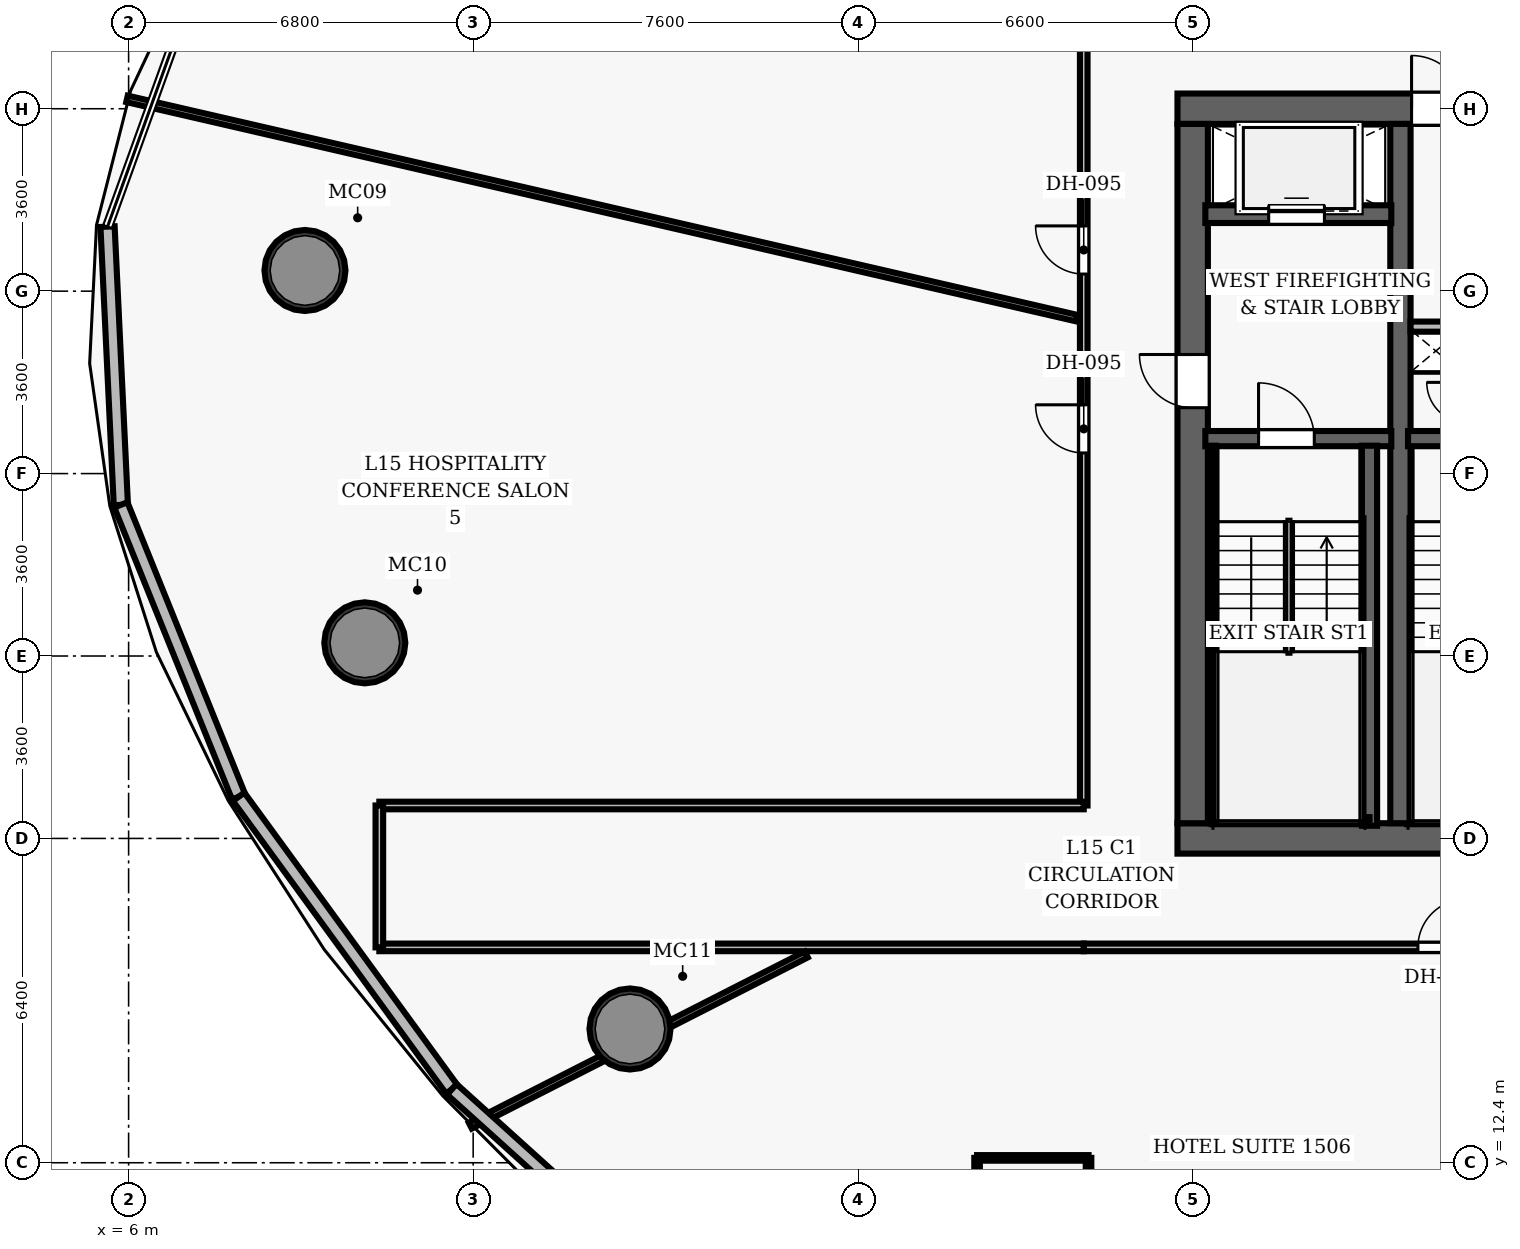
"""IFC4 building model, lengths in metres.
Left out: names, types, materials, properties, quantities, classifications, styles, units other than length and angle.
Written with IfcOpenShell. Run it as: python <this file> out.ifc"""

import sys

from ifc_helpers import new_model, si_unit, direction, frame, frame_2d, origin, origin_2d, place, context, subcontext, project, spatial, rectangle, hollow_circle, extrude, element, fill, save


model = new_model("IFC4")
c1 = context("Model", 3, precision=1e-05, world=origin(), true_north=direction((0.0, 1.0)))
c2 = subcontext(c1, "Body", "Model", "MODEL_VIEW")
j1 = project(units=[si_unit("LENGTHUNIT", "METRE"), si_unit("PLANEANGLEUNIT", "RADIAN")], contexts=[c1])
p1 = place(None, origin())
s1 = spatial("IfcSite", under=j1, at=p1, CompositionType="ELEMENT")
p2 = place(p1, origin())
s2 = spatial("IfcBuilding", under=s1, at=p2, CompositionType="ELEMENT")
p3 = place(p2, frame((0.0, 0.0, 69.4)))
s3 = spatial("IfcBuildingStorey", under=s2, at=p3, CompositionType="ELEMENT", Elevation=69.4)
p4 = place(p3, frame((26.7, 18.8, 0.0), z_axis=(0.0, 0.0, 1.0), x_axis=(1.0, 0.0, 0.0)))
e1 = element("IfcWall", 1, at=p4, inside=s3, PredefinedType="SHEAR", context=c2, shape_type="SweptSolid", body=[
    extrude(rectangle(XDim=22.6, YDim=0.6, at=frame_2d((11.3, 0.0))), origin(), (0.0, 0.0, 1.0), 3.5),
])
p5 = place(p4, frame((14.52, 0.0, 0.0)))
e2 = element("IfcOpeningElement", 2, at=p5, cuts=e1, PredefinedType="OPENING", context=c2, shape_type="SweptSolid", body=[
    extrude(rectangle(XDim=1.05, YDim=2.15, at=frame_2d((0.525, 1.075))), frame((0.0, 0.31, 0.0), z_axis=(0.0, -1.0, 0.0), x_axis=(1.0, 0.0, 0.0)), (0.0, 0.0, 1.0), 0.62),
])
p6 = place(p3, frame((26.7, 33.2, 0.0), z_axis=(0.0, 0.0, 1.0), x_axis=(1.0, 0.0, 0.0)))
e3 = element("IfcWall", 3, at=p6, inside=s3, PredefinedType="SHEAR", context=c2, shape_type="SweptSolid", body=[
    extrude(rectangle(XDim=22.6, YDim=0.6, at=frame_2d((11.3, 0.0))), origin(), (0.0, 0.0, 1.0), 3.5),
])
p7 = place(p6, frame((4.62, 0.0, 0.0)))
e4 = element("IfcOpeningElement", 4, at=p7, cuts=e3, PredefinedType="OPENING", context=c2, shape_type="SweptSolid", body=[
    extrude(rectangle(XDim=1.05, YDim=2.15, at=frame_2d((0.525, 1.075))), frame((0.0, 0.31, 0.0), z_axis=(0.0, -1.0, 0.0), x_axis=(1.0, 0.0, 0.0)), (0.0, 0.0, 1.0), 0.62),
])
p8 = place(p6, frame((14.52, 0.0, 0.0)))
e5 = element("IfcOpeningElement", 5, at=p8, cuts=e3, PredefinedType="OPENING", context=c2, shape_type="SweptSolid", body=[
    extrude(rectangle(XDim=1.05, YDim=2.15, at=frame_2d((0.525, 1.075))), frame((0.0, 0.31, 0.0), z_axis=(0.0, -1.0, 0.0), x_axis=(1.0, 0.0, 0.0)), (0.0, 0.0, 1.0), 0.62),
])
p9 = place(p3, frame((27.0, 19.1, 0.0), z_axis=(0.0, 0.0, 1.0), x_axis=(0.0, 1.0, 0.0)))
e6 = element("IfcWall", 6, at=p9, inside=s3, PredefinedType="SHEAR", context=c2, shape_type="SweptSolid", body=[
    extrude(rectangle(XDim=13.8, YDim=0.6, at=frame_2d((6.9, 0.0))), origin(), (0.0, 0.0, 1.0), 3.5),
])
p10 = place(p9, frame((8.2, 0.0, 0.0)))
e7 = element("IfcOpeningElement", 7, at=p10, cuts=e6, PredefinedType="OPENING", context=c2, shape_type="SweptSolid", body=[
    extrude(rectangle(XDim=1.05, YDim=2.15, at=frame_2d((0.525, 1.075))), frame((0.0, 0.31, 0.0), z_axis=(0.0, -1.0, 0.0), x_axis=(1.0, 0.0, 0.0)), (0.0, 0.0, 1.0), 0.62),
])
p11 = place(p3, frame((31.1, 19.1, 0.0), z_axis=(0.0, 0.0, 1.0), x_axis=(0.0, 1.0, 0.0)))
e8 = element("IfcWall", 8, at=p11, inside=s3, PredefinedType="SHEAR", context=c2, shape_type="SweptSolid", body=[
    extrude(rectangle(XDim=13.8, YDim=0.4, at=frame_2d((6.9, 0.0))), origin(), (0.0, 0.0, 1.0), 3.5),
])
for number, where, z_axis, x_axis in (
    (9, (9.48, 30.008, 0.0), (0.0, 0.0, 1.0), (1.0, 0.0, 0.0)),
    (10, (10.661, 22.66, 0.0), (0.0, 0.0, 1.0), (1.0, 0.0, 0.0)),
    (11, (15.895, 15.04, 0.0), (0.0, 0.0, 1.0), (1.0, 0.0, 0.0)),
):
    element("IfcColumn", number, at=place(p3, frame(where, z_axis=z_axis, x_axis=x_axis)), inside=s3, PredefinedType="COLUMN", context=c2, shape_type="SweptSolid", body=[
        extrude(hollow_circle(Radius=0.8, WallThickness=0.06, at=origin_2d()), origin(), (0.0, 0.0, 1.0), 3.5),
    ])
p12 = place(p3, frame((27.25, 26.69, 0.0), z_axis=(0.0, 0.0, 1.0), x_axis=(1.0, 0.0, 0.0)))
e12 = element("IfcWall", 12, at=p12, inside=s3, PredefinedType="SHEAR", context=c2, shape_type="SweptSolid", body=[
    extrude(rectangle(XDim=3.67, YDim=0.3, at=frame_2d((1.835, 0.0))), origin(), (0.0, 0.0, 1.0), 3.5),
])
p13 = place(p12, frame((1.05, 0.0, 0.0)))
e13 = element("IfcOpeningElement", 13, at=p13, cuts=e12, PredefinedType="OPENING", context=c2, shape_type="SweptSolid", body=[
    extrude(rectangle(XDim=1.1, YDim=2.15, at=frame_2d((0.55, 1.075))), frame((0.0, 0.16, 0.0), z_axis=(0.0, -1.0, 0.0), x_axis=(1.0, 0.0, 0.0)), (0.0, 0.0, 1.0), 0.32),
])
p14 = place(p3, frame((30.49, 19.05, 0.0), z_axis=(0.0, 0.0, 1.0), x_axis=(0.0, 1.0, 0.0)))
e14 = element("IfcWall", 14, at=p14, inside=s3, PredefinedType="SHEAR", context=c2, shape_type="SweptSolid", body=[
    extrude(rectangle(XDim=7.5, YDim=0.3, at=frame_2d((3.75, 0.0))), origin(), (0.0, 0.0, 1.0), 3.5),
])
p15 = place(p3, frame((27.395, 19.1, 0.0), z_axis=(0.0, 0.0, 1.0), x_axis=(0.0, 1.0, 0.0)))
e15 = element("IfcWall", 15, at=p15, inside=s3, PredefinedType="SHEAR", context=c2, shape_type="SweptSolid", body=[
    extrude(rectangle(XDim=7.45, YDim=0.12, at=frame_2d((3.725, 0.0))), origin(), (0.0, 0.0, 1.0), 3.5),
])
p16 = place(p3, frame((27.395, 19.16, 0.0), z_axis=(0.0, 0.0, 1.0), x_axis=(1.0, 0.0, 0.0)))
e16 = element("IfcWall", 16, at=p16, inside=s3, PredefinedType="SHEAR", context=c2, shape_type="SweptSolid", body=[
    extrude(rectangle(XDim=3.095, YDim=0.12, at=frame_2d((1.547, 0.0))), origin(), (0.0, 0.0, 1.0), 3.5),
])
p17 = place(p3, frame((27.25, 31.12, 0.0), z_axis=(0.0, 0.0, 1.0), x_axis=(1.0, 0.0, 0.0)))
e17 = element("IfcWall", 17, at=p17, inside=s3, PredefinedType="SHEAR", context=c2, shape_type="SweptSolid", body=[
    extrude(rectangle(XDim=3.67, YDim=0.35, at=frame_2d((1.835, 0.0))), origin(), (0.0, 0.0, 1.0), 2.6),
])
p18 = place(p17, frame((1.25, 0.0, 0.0)))
e18 = element("IfcOpeningElement", 18, at=p18, cuts=e17, PredefinedType="OPENING", context=c2, shape_type="SweptSolid", body=[
    extrude(rectangle(XDim=1.1, YDim=2.15, at=frame_2d((0.55, 1.075))), frame((0.0, 0.185, 0.0), z_axis=(0.0, -1.0, 0.0), x_axis=(1.0, 0.0, 0.0)), (0.0, 0.0, 1.0), 0.37),
])
p19 = place(p3, frame((31.25, 26.69, 0.0), z_axis=(0.0, 0.0, 1.0), x_axis=(1.0, 0.0, 0.0)))
e19 = element("IfcWall", 19, at=p19, inside=s3, PredefinedType="SHEAR", context=c2, shape_type="SweptSolid", body=[
    extrude(rectangle(XDim=3.56, YDim=0.3, at=frame_2d((1.78, 0.0))), origin(), (0.0, 0.0, 1.0), 3.5),
])
p20 = place(p19, frame((1.55, 0.0, 0.0)))
e20 = element("IfcOpeningElement", 20, at=p20, cuts=e19, PredefinedType="OPENING", context=c2, shape_type="SweptSolid", body=[
    extrude(rectangle(XDim=1.1, YDim=2.15, at=frame_2d((0.55, 1.075))), frame((0.0, 0.16, 0.0), z_axis=(0.0, -1.0, 0.0), x_axis=(1.0, 0.0, 0.0)), (0.0, 0.0, 1.0), 0.32),
])
p21 = place(p3, frame((31.3, 19.16, 0.0), z_axis=(0.0, 0.0, 1.0), x_axis=(1.0, 0.0, 0.0)))
e21 = element("IfcWall", 21, at=p21, inside=s3, PredefinedType="SHEAR", context=c2, shape_type="SweptSolid", body=[
    extrude(rectangle(XDim=3.04, YDim=0.12, at=frame_2d((1.52, 0.0))), origin(), (0.0, 0.0, 1.0), 3.5),
])
p22 = place(p3, frame((31.3, 28.9, 0.0), z_axis=(0.0, 0.0, 1.0), x_axis=(1.0, 0.0, 0.0)))
e22 = element("IfcWall", 22, at=p22, inside=s3, PredefinedType="PARTITIONING", context=c2, shape_type="SweptSolid", body=[
    extrude(rectangle(XDim=1.12, YDim=0.2, at=frame_2d((0.56, 0.0))), origin(), (0.0, 0.0, 1.0), 2.6),
])
p23 = place(p3, frame((24.85, 16.65, 0.0), z_axis=(0.0, 0.0, 1.0), x_axis=(1.0, 0.0, 0.0)))
e23 = element("IfcWall", 23, at=p23, inside=s3, PredefinedType="PARTITIONING", context=c2, shape_type="SweptSolid", body=[
    extrude(rectangle(XDim=23.5, YDim=0.15, at=frame_2d((11.75, 0.0))), origin(), (0.0, 0.0, 1.0), 2.6),
])
p24 = place(p23, frame((6.595, 0.0, 0.0)))
e24 = element("IfcOpeningElement", 24, at=p24, cuts=e23, PredefinedType="OPENING", context=c2, shape_type="SweptSolid", body=[
    extrude(rectangle(XDim=0.95, YDim=2.15, at=frame_2d((0.475, 1.075))), frame((0.0, 0.085, 0.0), z_axis=(0.0, -1.0, 0.0), x_axis=(1.0, 0.0, 0.0)), (0.0, 0.0, 1.0), 0.17),
])
p25 = place(p23, frame((13.99, 0.0, 0.0)))
e25 = element("IfcOpeningElement", 25, at=p25, cuts=e23, PredefinedType="OPENING", context=c2, shape_type="SweptSolid", body=[
    extrude(rectangle(XDim=0.95, YDim=2.15, at=frame_2d((0.475, 1.075))), frame((0.0, 0.085, 0.0), z_axis=(0.0, -1.0, 0.0), x_axis=(1.0, 0.0, 0.0)), (0.0, 0.0, 1.0), 0.17),
])
p26 = place(p23, frame((17.211, 0.0, 0.0)))
e26 = element("IfcOpeningElement", 26, at=p26, cuts=e23, PredefinedType="OPENING", context=c2, shape_type="SweptSolid", body=[
    extrude(rectangle(XDim=0.95, YDim=2.15, at=frame_2d((0.475, 1.075))), frame((0.0, 0.085, 0.0), z_axis=(0.0, -1.0, 0.0), x_axis=(1.0, 0.0, 0.0)), (0.0, 0.0, 1.0), 0.17),
])
p27 = place(p3, frame((24.85, 19.45, 0.0), z_axis=(0.0, 0.0, 1.0), x_axis=(0.0, 1.0, 0.0)))
e27 = element("IfcWall", 27, at=p27, inside=s3, PredefinedType="PARTITIONING", context=c2, shape_type="SweptSolid", body=[
    extrude(rectangle(XDim=15.9, YDim=0.15, at=frame_2d((7.95, 0.0))), origin(), (0.0, 0.0, 1.0), 2.6),
])
p28 = place(p27, frame((10.488, 0.0, 0.0)))
e28 = element("IfcOpeningElement", 28, at=p28, cuts=e27, PredefinedType="OPENING", context=c2, shape_type="SweptSolid", body=[
    extrude(rectangle(XDim=0.95, YDim=2.15, at=frame_2d((0.475, 1.075))), frame((0.0, 0.085, 0.0), z_axis=(0.0, -1.0, 0.0), x_axis=(1.0, 0.0, 0.0)), (0.0, 0.0, 1.0), 0.17),
])
p29 = place(p27, frame((6.958, 0.0, 0.0)))
e29 = element("IfcOpeningElement", 29, at=p29, cuts=e27, PredefinedType="OPENING", context=c2, shape_type="SweptSolid", body=[
    extrude(rectangle(XDim=0.95, YDim=2.15, at=frame_2d((0.475, 1.075))), frame((0.0, 0.085, 0.0), z_axis=(0.0, -1.0, 0.0), x_axis=(1.0, 0.0, 0.0)), (0.0, 0.0, 1.0), 0.17),
])
for number, where, z_axis, x_axis in (
    (30, (10.948, 19.45, 0.0), (0.0, 0.0, 1.0), (1.0, 0.0, 0.0)),
    (31, (10.948, 16.65, 0.0), (0.0, 0.0, 1.0), (1.0, 0.0, 0.0)),
):
    element("IfcWall", number, at=place(p3, frame(where, z_axis=z_axis, x_axis=x_axis)), inside=s3, PredefinedType="PARTITIONING", context=c2, shape_type="SweptSolid", body=[
        extrude(rectangle(XDim=13.902, YDim=0.15, at=frame_2d((6.951, 0.0))), origin(), (0.0, 0.0, 1.0), 2.6),
    ])
p30 = place(p3, frame((10.948, 16.65, 0.0), z_axis=(0.0, 0.0, 1.0), x_axis=(0.0, 1.0, 0.0)))
e32 = element("IfcWall", 32, at=p30, inside=s3, PredefinedType="PARTITIONING", context=c2, shape_type="SweptSolid", body=[
    extrude(rectangle(XDim=2.8, YDim=0.15, at=frame_2d((1.4, 0.0))), origin(), (0.0, 0.0, 1.0), 2.6),
])
p31 = place(p3, frame((24.71, 29.068, 0.0), z_axis=(0.0, 0.0, 1.0), x_axis=(-0.974369585044, 0.224953132321, 0.0)))
e33 = element("IfcWall", 33, at=p31, inside=s3, PredefinedType="PARTITIONING", context=c2, shape_type="SweptSolid", body=[
    extrude(rectangle(XDim=19.235, YDim=0.13, at=frame_2d((9.617, 0.0))), origin(), (0.0, 0.0, 1.0), 2.6),
])
p32 = place(p3, frame((19.375, 16.51, 0.0), z_axis=(0.0, 0.0, 1.0), x_axis=(-0.891002691838, -0.453998021073, 0.0)))
e34 = element("IfcWall", 34, at=p32, inside=s3, PredefinedType="PARTITIONING", context=c2, shape_type="SweptSolid", body=[
    extrude(rectangle(XDim=7.442, YDim=0.13, at=frame_2d((3.721, 0.0))), origin(), (0.0, 0.0, 1.0), 2.6),
])
p33 = place(p3, frame((33.972, 16.51, 0.0), z_axis=(0.0, 0.0, 1.0), x_axis=(-0.390724738728, -0.920507565719, 0.0)))
e35 = element("IfcWall", 35, at=p33, inside=s3, PredefinedType="PARTITIONING", context=c2, shape_type="SweptSolid", body=[
    extrude(rectangle(XDim=14.483, YDim=0.13, at=frame_2d((7.241, 0.0))), origin(), (0.0, 0.0, 1.0), 2.6),
])
p34 = place(p3, frame((22.745, 12.496, 0.0), z_axis=(0.0, 0.0, 1.0), x_axis=(1.0, 0.0, 0.0)))
e36 = element("IfcWall", 36, at=p34, inside=s3, PredefinedType="PARTITIONING", context=c2, shape_type="SweptSolid", body=[
    extrude(rectangle(XDim=2.2, YDim=0.11, at=frame_2d((1.1, 0.0))), origin(), (0.0, 0.0, 1.0), 2.6),
])
for number, where, z_axis, x_axis in (
    (37, (22.745, 10.736, 0.0), (0.0, 0.0, 1.0), (0.0, 1.0, 0.0)),
    (38, (24.945, 10.736, 0.0), (0.0, 0.0, 1.0), (0.0, 1.0, 0.0)),
):
    element("IfcWall", number, at=place(p3, frame(where, z_axis=z_axis, x_axis=x_axis)), inside=s3, PredefinedType="PARTITIONING", context=c2, shape_type="SweptSolid", body=[
        extrude(rectangle(XDim=1.76, YDim=0.11, at=frame_2d((0.88, 0.0))), origin(), (0.0, 0.0, 1.0), 2.6),
    ])
p35 = place(p3, frame((5.847, 25.382, 0.0), z_axis=(0.0, 0.0, 1.0), x_axis=(-0.047784583266, 0.998857664336, 0.0)))
e39 = element("IfcWall", 39, at=p35, inside=s3, PredefinedType="SOLIDWALL", context=c2, shape_type="SweptSolid", body=[
    extrude(rectangle(XDim=5.498, YDim=0.28, at=frame_2d((2.749, 0.0))), origin(), (0.0, 0.0, 1.0), 3.25),
])
p36 = place(p3, frame((8.171, 19.621, 0.0), z_axis=(0.0, 0.0, 1.0), x_axis=(-0.374140076089, 0.927372203306, 0.0)))
e40 = element("IfcWall", 40, at=p36, inside=s3, PredefinedType="SOLIDWALL", context=c2, shape_type="SweptSolid", body=[
    extrude(rectangle(XDim=6.212, YDim=0.28, at=frame_2d((3.106, 0.0))), origin(), (0.0, 0.0, 1.0), 3.25),
])
p37 = place(p3, frame((12.378, 13.849, 0.0), z_axis=(0.0, 0.0, 1.0), x_axis=(-0.589022914042, 0.808116332426, 0.0)))
e41 = element("IfcWall", 41, at=p37, inside=s3, PredefinedType="SOLIDWALL", context=c2, shape_type="SweptSolid", body=[
    extrude(rectangle(XDim=7.143, YDim=0.28, at=frame_2d((3.571, 0.0))), origin(), (0.0, 0.0, 1.0), 3.25),
])
p38 = place(p3, frame((18.202, 8.593, 0.0), z_axis=(0.0, 0.0, 1.0), x_axis=(-0.742344790323, 0.670018068623, 0.0)))
e42 = element("IfcWall", 42, at=p38, inside=s3, PredefinedType="SOLIDWALL", context=c2, shape_type="SweptSolid", body=[
    extrude(rectangle(XDim=7.845, YDim=0.28, at=frame_2d((3.922, 0.0))), origin(), (0.0, 0.0, 1.0), 3.25),
])
p39 = place(p13, origin())
e43 = element("IfcDoor", 43, at=p39, inside=s3, OperationType="SINGLE_SWING_LEFT", PredefinedType="DOOR", context=c2, shape_type="SweptSolid", body=[
    extrude(rectangle(XDim=1.1, YDim=2.15, at=frame_2d((0.55, 1.075))), frame((0.0, 0.025, 0.0), z_axis=(0.0, -1.0, 0.0), x_axis=(1.0, 0.0, 0.0)), (0.0, 0.0, 1.0), 0.05),
])
fill(e13, e43)
p40 = place(p10, origin())
e44 = element("IfcDoor", 44, at=p40, inside=s3, OperationType="SINGLE_SWING_RIGHT", PredefinedType="DOOR", context=c2, shape_type="SweptSolid", body=[
    extrude(rectangle(XDim=1.05, YDim=2.15, at=frame_2d((0.525, 1.075))), frame((0.0, 0.025, 0.0), z_axis=(0.0, -1.0, 0.0), x_axis=(1.0, 0.0, 0.0)), (0.0, 0.0, 1.0), 0.05),
])
fill(e7, e44)
p41 = place(p7, origin())
e45 = element("IfcDoor", 45, at=p41, inside=s3, OperationType="SINGLE_SWING_LEFT", PredefinedType="DOOR", context=c2, shape_type="SweptSolid", body=[
    extrude(rectangle(XDim=1.05, YDim=2.15, at=frame_2d((0.525, 1.075))), frame((0.0, 0.025, 0.0), z_axis=(0.0, -1.0, 0.0), x_axis=(1.0, 0.0, 0.0)), (0.0, 0.0, 1.0), 0.05),
])
fill(e4, e45)
p42 = place(p28, origin())
e46 = element("IfcDoor", 46, at=p42, inside=s3, OperationType="SINGLE_SWING_RIGHT", PredefinedType="DOOR", context=c2, shape_type="SweptSolid", body=[
    extrude(rectangle(XDim=0.95, YDim=2.15, at=frame_2d((0.475, 1.075))), frame((0.0, 0.025, 0.0), z_axis=(0.0, -1.0, 0.0), x_axis=(1.0, 0.0, 0.0)), (0.0, 0.0, 1.0), 0.05),
])
fill(e28, e46)
p43 = place(p29, origin())
e47 = element("IfcDoor", 47, at=p43, inside=s3, OperationType="SINGLE_SWING_RIGHT", PredefinedType="DOOR", context=c2, shape_type="SweptSolid", body=[
    extrude(rectangle(XDim=0.95, YDim=2.15, at=frame_2d((0.475, 1.075))), frame((0.0, 0.025, 0.0), z_axis=(0.0, -1.0, 0.0), x_axis=(1.0, 0.0, 0.0)), (0.0, 0.0, 1.0), 0.05),
])
fill(e29, e47)
p44 = place(p24, origin())
e48 = element("IfcDoor", 48, at=p44, inside=s3, OperationType="SINGLE_SWING_RIGHT", PredefinedType="DOOR", context=c2, shape_type="SweptSolid", body=[
    extrude(rectangle(XDim=0.95, YDim=2.15, at=frame_2d((0.475, 1.075))), frame((0.0, 0.025, 0.0), z_axis=(0.0, -1.0, 0.0), x_axis=(1.0, 0.0, 0.0)), (0.0, 0.0, 1.0), 0.05),
])
fill(e24, e48)
p45 = place(p18, origin())
e49 = element("IfcDoor", 49, at=p45, inside=s3, OperationType="SLIDING_TO_LEFT", PredefinedType="DOOR", context=c2, shape_type="SweptSolid", body=[
    extrude(rectangle(XDim=1.1, YDim=2.15, at=frame_2d((0.55, 1.075))), frame((0.0, 0.025, 0.0), z_axis=(0.0, -1.0, 0.0), x_axis=(1.0, 0.0, 0.0)), (0.0, 0.0, 1.0), 0.05),
])
fill(e18, e49)
save(model, sys.argv[1])
